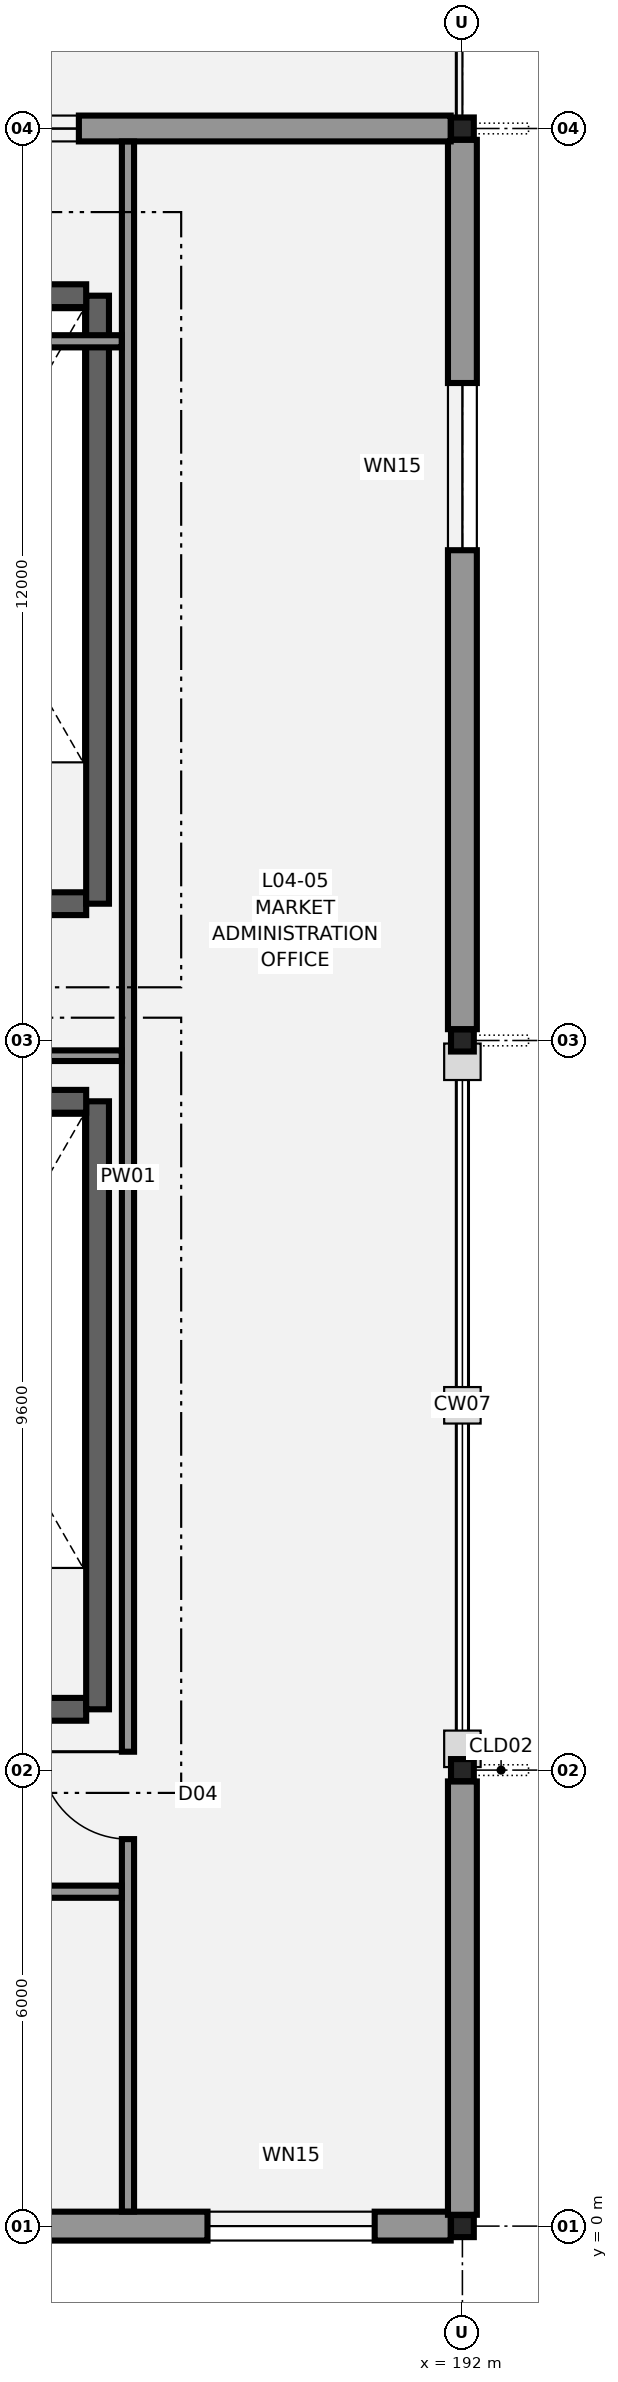
"""IFC4 building model, lengths in metres.
Left out: names, types, materials, properties, quantities, classifications, styles, units other than length and angle.
Written with IfcOpenShell. Run it as: python <this file> out.ifc"""

import sys

from ifc_helpers import new_model, si_unit, direction, frame, frame_2d, origin, origin_2d, place, context, subcontext, project, spatial, rectangle, i_section, extrude, element, fill, save


model = new_model("IFC4")
c1 = context("Model", 3, precision=1e-05, world=origin(), true_north=direction((0.0, 1.0)))
c2 = subcontext(c1, "Body", "Model", "MODEL_VIEW")
j1 = project(units=[si_unit("LENGTHUNIT", "METRE"), si_unit("PLANEANGLEUNIT", "RADIAN")], contexts=[c1])
p1 = place(None, origin())
s1 = spatial("IfcSite", under=j1, at=p1, CompositionType="ELEMENT")
p2 = place(p1, origin())
s2 = spatial("IfcBuilding", under=s1, at=p2, CompositionType="ELEMENT")
p3 = place(p2, frame((0.0, 0.0, 18.6)))
s3 = spatial("IfcBuildingStorey", under=s2, at=p3, CompositionType="ELEMENT", Elevation=18.6)
for number, where, z_axis, x_axis in (
    (1, (192.0, 0.0, 0.0), (0.0, 0.0, 1.0), (1.0, 0.0, 0.0)),
    (2, (192.0, 6.0, 0.0), (0.0, 0.0, 1.0), (1.0, 0.0, 0.0)),
    (3, (192.0, 15.6, 0.0), (0.0, 0.0, 1.0), (1.0, 0.0, 0.0)),
    (4, (192.0, 27.6, 0.0), (0.0, 0.0, 1.0), (1.0, 0.0, 0.0)),
):
    element("IfcColumn", number, at=place(p3, frame(where, z_axis=z_axis, x_axis=x_axis)), inside=s3, PredefinedType="COLUMN", context=c2, shape_type="SweptSolid", body=[
        extrude(i_section(OverallWidth=0.3, OverallDepth=0.29, WebThickness=0.009, FlangeThickness=0.014, FilletRadius=0.027, at=origin_2d()), origin(), (0.0, 0.0, 1.0), 2.9),
    ])
p4 = place(p3, frame((187.05, 6.8, 0.0), z_axis=(0.0, 0.0, 1.0), x_axis=(-1.0, 0.0, 0.0)))
e5 = element("IfcWall", 5, at=p4, inside=s3, PredefinedType="SHEAR", context=c2, shape_type="SweptSolid", body=[
    extrude(rectangle(XDim=3.5, YDim=0.3, at=frame_2d((1.75, 0.0))), origin(), (0.0, 0.0, 1.0), 2.7),
])
p5 = place(p4, frame((0.95, 0.0, 0.0)))
e6 = element("IfcOpeningElement", 6, at=p5, cuts=e5, PredefinedType="OPENING", context=c2, shape_type="SweptSolid", body=[
    extrude(rectangle(XDim=1.1, YDim=2.15, at=frame_2d((0.55, 1.075))), frame((0.0, 0.16, 0.0), z_axis=(0.0, -1.0, 0.0), x_axis=(1.0, 0.0, 0.0)), (0.0, 0.0, 1.0), 0.32),
])
p6 = place(p3, frame((187.2, 6.8, 0.0), z_axis=(0.0, 0.0, 1.0), x_axis=(0.0, 1.0, 0.0)))
e7 = element("IfcWall", 7, at=p6, inside=s3, PredefinedType="SHEAR", context=c2, shape_type="SweptSolid", body=[
    extrude(rectangle(XDim=8.0, YDim=0.3, at=frame_2d((4.0, 0.0))), origin(), (0.0, 0.0, 1.0), 2.7),
])
p7 = place(p3, frame((187.05, 14.8, 0.0), z_axis=(0.0, 0.0, 1.0), x_axis=(-1.0, 0.0, 0.0)))
e8 = element("IfcWall", 8, at=p7, inside=s3, PredefinedType="SHEAR", context=c2, shape_type="SweptSolid", body=[
    extrude(rectangle(XDim=3.5, YDim=0.3, at=frame_2d((1.75, 0.0))), origin(), (0.0, 0.0, 1.0), 2.7),
])
p8 = place(p3, frame((187.05, 17.4, 0.0), z_axis=(0.0, 0.0, 1.0), x_axis=(-1.0, 0.0, 0.0)))
e9 = element("IfcWall", 9, at=p8, inside=s3, PredefinedType="SHEAR", context=c2, shape_type="SweptSolid", body=[
    extrude(rectangle(XDim=3.5, YDim=0.3, at=frame_2d((1.75, 0.0))), origin(), (0.0, 0.0, 1.0), 2.7),
])
p9 = place(p8, frame((0.95, 0.0, 0.0)))
e10 = element("IfcOpeningElement", 10, at=p9, cuts=e9, PredefinedType="OPENING", context=c2, shape_type="SweptSolid", body=[
    extrude(rectangle(XDim=1.2, YDim=2.2, at=frame_2d((0.6, 1.1))), frame((0.0, 0.16, 0.0), z_axis=(0.0, -1.0, 0.0), x_axis=(1.0, 0.0, 0.0)), (0.0, 0.0, 1.0), 0.32),
])
p10 = place(p3, frame((187.2, 17.4, 0.0), z_axis=(0.0, 0.0, 1.0), x_axis=(0.0, 1.0, 0.0)))
e11 = element("IfcWall", 11, at=p10, inside=s3, PredefinedType="SHEAR", context=c2, shape_type="SweptSolid", body=[
    extrude(rectangle(XDim=8.0, YDim=0.3, at=frame_2d((4.0, 0.0))), origin(), (0.0, 0.0, 1.0), 2.7),
])
p11 = place(p3, frame((187.05, 25.4, 0.0), z_axis=(0.0, 0.0, 1.0), x_axis=(-1.0, 0.0, 0.0)))
e12 = element("IfcWall", 12, at=p11, inside=s3, PredefinedType="SHEAR", context=c2, shape_type="SweptSolid", body=[
    extrude(rectangle(XDim=3.5, YDim=0.3, at=frame_2d((1.75, 0.0))), origin(), (0.0, 0.0, 1.0), 2.7),
])
p12 = place(p3, frame((191.846, 0.0, 0.0), z_axis=(0.0, 0.0, 1.0), x_axis=(-1.0, 0.0, 0.0)))
e13 = element("IfcWall", 13, at=p12, inside=s3, PredefinedType="STANDARD", context=c2, shape_type="SweptSolid", body=[
    extrude(rectangle(XDim=10.492, YDim=0.38, at=frame_2d((5.246, 0.0))), origin(), (0.0, 0.0, 1.0), 2.45),
])
p13 = place(p12, frame((1.0, 0.0, 0.8)))
e14 = element("IfcOpeningElement", 14, at=p13, cuts=e13, PredefinedType="OPENING", context=c2, shape_type="SweptSolid", body=[
    extrude(rectangle(XDim=2.2, YDim=1.4, at=frame_2d((1.1, 0.7))), frame((0.0, 0.2, 0.0), z_axis=(0.0, -1.0, 0.0), x_axis=(1.0, 0.0, 0.0)), (0.0, 0.0, 1.0), 0.4),
])
p14 = place(p12, frame((5.6, 0.0, 0.8)))
e15 = element("IfcOpeningElement", 15, at=p14, cuts=e13, PredefinedType="OPENING", context=c2, shape_type="SweptSolid", body=[
    extrude(rectangle(XDim=1.8, YDim=1.4, at=frame_2d((0.9, 0.7))), frame((0.0, 0.2, 0.0), z_axis=(0.0, -1.0, 0.0), x_axis=(1.0, 0.0, 0.0)), (0.0, 0.0, 1.0), 0.4),
])
p15 = place(p3, frame((192.0, 5.851, 0.0), z_axis=(0.0, 0.0, 1.0), x_axis=(0.0, -1.0, 0.0)))
e16 = element("IfcWall", 16, at=p15, inside=s3, PredefinedType="STANDARD", context=c2, shape_type="SweptSolid", body=[
    extrude(rectangle(XDim=5.702, YDim=0.38, at=frame_2d((2.851, 0.0))), origin(), (0.0, 0.0, 1.0), 2.45),
])
p16 = place(p3, frame((192.0, 27.451, 0.0), z_axis=(0.0, 0.0, 1.0), x_axis=(0.0, -1.0, 0.0)))
e17 = element("IfcWall", 17, at=p16, inside=s3, PredefinedType="STANDARD", context=c2, shape_type="SweptSolid", body=[
    extrude(rectangle(XDim=11.702, YDim=0.38, at=frame_2d((5.851, 0.0))), origin(), (0.0, 0.0, 1.0), 2.45),
])
p17 = place(p16, frame((3.2, 0.0, 0.8)))
e18 = element("IfcOpeningElement", 18, at=p17, cuts=e17, PredefinedType="OPENING", context=c2, shape_type="SweptSolid", body=[
    extrude(rectangle(XDim=2.2, YDim=1.4, at=frame_2d((1.1, 0.7))), frame((0.0, 0.2, 0.0), z_axis=(0.0, -1.0, 0.0), x_axis=(1.0, 0.0, 0.0)), (0.0, 0.0, 1.0), 0.4),
])
p18 = place(p3, frame((181.354, 27.6, 0.0), z_axis=(0.0, 0.0, 1.0), x_axis=(1.0, 0.0, 0.0)))
e19 = element("IfcWall", 19, at=p18, inside=s3, PredefinedType="STANDARD", context=c2, shape_type="SweptSolid", body=[
    extrude(rectangle(XDim=10.492, YDim=0.34, at=frame_2d((5.246, 0.0))), origin(), (0.0, 0.0, 1.0), 2.45),
])
p19 = place(p18, frame((3.4, 0.0, 0.8)))
e20 = element("IfcOpeningElement", 20, at=p19, cuts=e19, PredefinedType="OPENING", context=c2, shape_type="SweptSolid", body=[
    extrude(rectangle(XDim=2.2, YDim=1.4, at=frame_2d((1.1, 0.7))), frame((0.0, 0.18, 0.0), z_axis=(0.0, -1.0, 0.0), x_axis=(1.0, 0.0, 0.0)), (0.0, 0.0, 1.0), 0.36),
])
p20 = place(p3, frame((187.6, 0.192, 0.0), z_axis=(0.0, 0.0, 1.0), x_axis=(0.0, 1.0, 0.0)))
e21 = element("IfcWall", 21, at=p20, inside=s3, PredefinedType="PARTITIONING", context=c2, shape_type="SweptSolid", body=[
    extrude(rectangle(XDim=27.236, YDim=0.16, at=frame_2d((13.618, 0.0))), origin(), (0.0, 0.0, 1.0), 2.45),
])
p21 = place(p20, frame((4.9, 0.0, 0.0)))
e22 = element("IfcOpeningElement", 22, at=p21, cuts=e21, PredefinedType="OPENING", context=c2, shape_type="SweptSolid", body=[
    extrude(rectangle(XDim=1.15, YDim=2.15, at=frame_2d((0.575, 1.075))), frame((0.0, 0.09, 0.0), z_axis=(0.0, -1.0, 0.0), x_axis=(1.0, 0.0, 0.0)), (0.0, 0.0, 1.0), 0.18),
])
p22 = place(p3, frame((169.902, 4.4, 0.0), z_axis=(0.0, 0.0, 1.0), x_axis=(1.0, 0.0, 0.0)))
e23 = element("IfcWall", 23, at=p22, inside=s3, PredefinedType="PARTITIONING", context=c2, shape_type="SweptSolid", body=[
    extrude(rectangle(XDim=17.616, YDim=0.16, at=frame_2d((8.808, 0.0))), origin(), (0.0, 0.0, 1.0), 2.45),
])
p23 = place(p22, frame((5.5, 0.0, 0.0)))
e24 = element("IfcOpeningElement", 24, at=p23, cuts=e23, PredefinedType="OPENING", context=c2, shape_type="SweptSolid", body=[
    extrude(rectangle(XDim=1.05, YDim=2.15, at=frame_2d((0.525, 1.075))), frame((0.0, 0.09, 0.0), z_axis=(0.0, -1.0, 0.0), x_axis=(1.0, 0.0, 0.0)), (0.0, 0.0, 1.0), 0.18),
])
p24 = place(p3, frame((172.902, 15.4, 0.0), z_axis=(0.0, 0.0, 1.0), x_axis=(1.0, 0.0, 0.0)))
e25 = element("IfcWall", 25, at=p24, inside=s3, PredefinedType="PARTITIONING", context=c2, shape_type="SweptSolid", body=[
    extrude(rectangle(XDim=14.616, YDim=0.14, at=frame_2d((7.308, 0.0))), origin(), (0.0, 0.0, 1.0), 2.45),
])
p25 = place(p24, frame((6.0, 0.0, 0.0)))
e26 = element("IfcOpeningElement", 26, at=p25, cuts=e25, PredefinedType="OPENING", context=c2, shape_type="SweptSolid", body=[
    extrude(rectangle(XDim=0.95, YDim=2.1, at=frame_2d((0.475, 1.05))), frame((0.0, 0.08, 0.0), z_axis=(0.0, -1.0, 0.0), x_axis=(1.0, 0.0, 0.0)), (0.0, 0.0, 1.0), 0.16),
])
p26 = place(p3, frame((172.902, 24.8, 0.0), z_axis=(0.0, 0.0, 1.0), x_axis=(1.0, 0.0, 0.0)))
e27 = element("IfcWall", 27, at=p26, inside=s3, PredefinedType="PARTITIONING", context=c2, shape_type="SweptSolid", body=[
    extrude(rectangle(XDim=14.616, YDim=0.16, at=frame_2d((7.308, 0.0))), origin(), (0.0, 0.0, 1.0), 2.45),
])
p27 = place(p13, origin())
e28 = element("IfcWindow", 28, at=p27, inside=s3, PartitioningType="SINGLE_PANEL", PredefinedType="WINDOW", context=c2, shape_type="SweptSolid", body=[
    extrude(rectangle(XDim=2.2, YDim=1.4, at=frame_2d((1.1, 0.7))), frame((0.0, 0.03, 0.0), z_axis=(0.0, -1.0, 0.0), x_axis=(1.0, 0.0, 0.0)), (0.0, 0.0, 1.0), 0.06),
])
fill(e14, e28)
p28 = place(p17, origin())
e29 = element("IfcWindow", 29, at=p28, inside=s3, PartitioningType="SINGLE_PANEL", PredefinedType="WINDOW", context=c2, shape_type="SweptSolid", body=[
    extrude(rectangle(XDim=2.2, YDim=1.4, at=frame_2d((1.1, 0.7))), frame((0.0, 0.03, 0.0), z_axis=(0.0, -1.0, 0.0), x_axis=(1.0, 0.0, 0.0)), (0.0, 0.0, 1.0), 0.06),
])
fill(e18, e29)
p29 = place(p19, origin())
e30 = element("IfcWindow", 30, at=p29, inside=s3, PartitioningType="SINGLE_PANEL", PredefinedType="WINDOW", context=c2, shape_type="SweptSolid", body=[
    extrude(rectangle(XDim=2.2, YDim=1.4, at=frame_2d((1.1, 0.7))), frame((0.0, 0.03, 0.0), z_axis=(0.0, -1.0, 0.0), x_axis=(1.0, 0.0, 0.0)), (0.0, 0.0, 1.0), 0.06),
])
fill(e20, e30)
p30 = place(p21, origin())
e31 = element("IfcDoor", 31, at=p30, inside=s3, OperationType="SINGLE_SWING_RIGHT", PredefinedType="DOOR", context=c2, shape_type="SweptSolid", body=[
    extrude(rectangle(XDim=1.15, YDim=2.15, at=frame_2d((0.575, 1.075))), frame((0.0, 0.025, 0.0), z_axis=(0.0, -1.0, 0.0), x_axis=(1.0, 0.0, 0.0)), (0.0, 0.0, 1.0), 0.05),
])
fill(e22, e31)
save(model, sys.argv[1])
